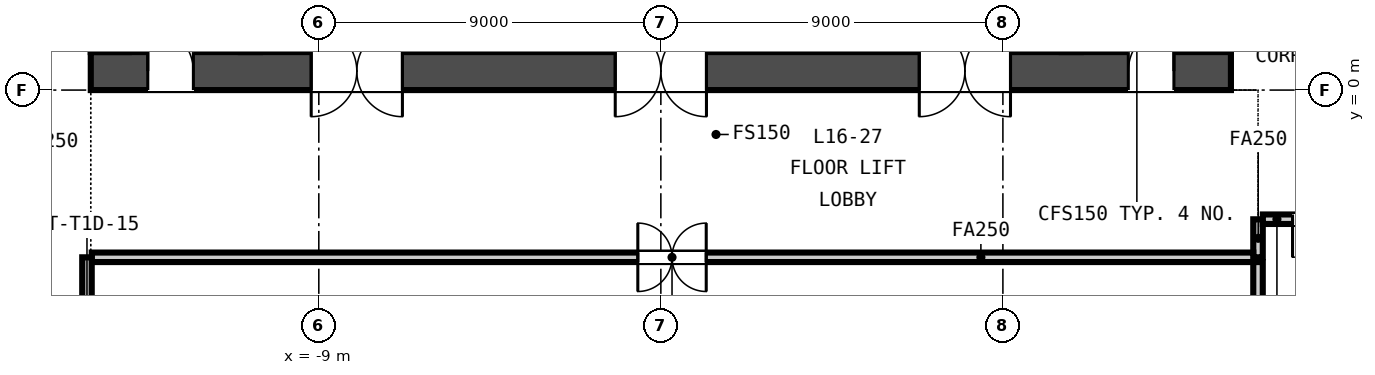
"""IFC4 building model, lengths in metres.
Left out: names, types, materials, properties, quantities, classifications, styles, units other than length and angle.
Written with IfcOpenShell. Run it as: python <this file> out.ifc"""

import sys

from ifc_helpers import new_model, si_unit, direction, frame, frame_2d, origin, place, context, subcontext, project, spatial, rectangle, extrude, element, fill, save


model = new_model("IFC4")
c1 = context("Model", 3, precision=1e-05, world=origin(), true_north=direction((0.0, 1.0)))
c2 = subcontext(c1, "Body", "Model", "MODEL_VIEW")
j1 = project(units=[si_unit("LENGTHUNIT", "METRE"), si_unit("PLANEANGLEUNIT", "RADIAN")], contexts=[c1])
p1 = place(None, origin())
s1 = spatial("IfcSite", under=j1, at=p1, CompositionType="ELEMENT")
p2 = place(p1, origin())
s2 = spatial("IfcBuilding", under=s1, at=p2, CompositionType="ELEMENT")
p3 = place(p2, frame((0.0, 0.0, 72.5)))
s3 = spatial("IfcBuildingStorey", under=s2, at=p3, CompositionType="ELEMENT", Elevation=72.5)
p4 = place(p3, frame((-15.0, 0.5, -0.15), z_axis=(0.0, 0.0, 1.0), x_axis=(1.0, 0.0, 0.0)))
e1 = element("IfcWall", 1, at=p4, inside=s3, PredefinedType="SOLIDWALL", context=c2, shape_type="SweptSolid", body=[
    extrude(rectangle(XDim=30.0, YDim=1.0, at=frame_2d((15.0, 0.0))), origin(), (0.0, 0.0, 1.0), 3.5),
])
p5 = place(p4, frame((5.8, 0.0, 0.15)))
e2 = element("IfcOpeningElement", 2, at=p5, cuts=e1, PredefinedType="OPENING", context=c2, shape_type="SweptSolid", body=[
    extrude(rectangle(XDim=2.4, YDim=2.4, at=frame_2d((1.2, 1.2))), frame((0.0, 0.51, 0.0), z_axis=(0.0, -1.0, 0.0), x_axis=(1.0, 0.0, 0.0)), (0.0, 0.0, 1.0), 1.02),
])
p6 = place(p4, frame((13.8, 0.0, 0.15)))
e3 = element("IfcOpeningElement", 3, at=p6, cuts=e1, PredefinedType="OPENING", context=c2, shape_type="SweptSolid", body=[
    extrude(rectangle(XDim=2.4, YDim=2.4, at=frame_2d((1.2, 1.2))), frame((0.0, 0.51, 0.0), z_axis=(0.0, -1.0, 0.0), x_axis=(1.0, 0.0, 0.0)), (0.0, 0.0, 1.0), 1.02),
])
p7 = place(p4, frame((21.8, 0.0, 0.15)))
e4 = element("IfcOpeningElement", 4, at=p7, cuts=e1, PredefinedType="OPENING", context=c2, shape_type="SweptSolid", body=[
    extrude(rectangle(XDim=2.4, YDim=2.4, at=frame_2d((1.2, 1.2))), frame((0.0, 0.51, 0.0), z_axis=(0.0, -1.0, 0.0), x_axis=(1.0, 0.0, 0.0)), (0.0, 0.0, 1.0), 1.02),
])
p8 = place(p4, frame((1.5, 0.0, 0.15)))
e5 = element("IfcOpeningElement", 5, at=p8, cuts=e1, PredefinedType="OPENING", context=c2, shape_type="SweptSolid", body=[
    extrude(rectangle(XDim=1.2, YDim=2.1, at=frame_2d((0.6, 1.05))), frame((0.0, 0.51, 0.0), z_axis=(0.0, -1.0, 0.0), x_axis=(1.0, 0.0, 0.0)), (0.0, 0.0, 1.0), 1.02),
])
p9 = place(p4, frame((27.3, 0.0, 0.15)))
e6 = element("IfcOpeningElement", 6, at=p9, cuts=e1, PredefinedType="OPENING", context=c2, shape_type="SweptSolid", body=[
    extrude(rectangle(XDim=1.2, YDim=2.1, at=frame_2d((0.6, 1.05))), frame((0.0, 0.51, 0.0), z_axis=(0.0, -1.0, 0.0), x_axis=(1.0, 0.0, 0.0)), (0.0, 0.0, 1.0), 1.02),
])
p10 = place(p3, frame((15.713, -3.4, 0.0), z_axis=(0.0, 0.0, 1.0), x_axis=(0.0, -1.0, 0.0)))
e7 = element("IfcWall", 7, at=p10, inside=s3, PredefinedType="PARTITIONING", context=c2, shape_type="SweptSolid", body=[
    extrude(rectangle(XDim=1.0, YDim=0.25, at=frame_2d((0.5, 0.0))), origin(), (0.0, 0.0, 1.0), 2.591),
])
p11 = place(p3, frame((15.588, -4.4, 0.0), z_axis=(0.0, 0.0, 1.0), x_axis=(-1.0, 0.0, 0.0)))
e8 = element("IfcWall", 8, at=p11, inside=s3, PredefinedType="PARTITIONING", context=c2, shape_type="SweptSolid", body=[
    extrude(rectangle(XDim=30.563, YDim=0.25, at=frame_2d((15.281, 0.0))), origin(), (0.0, 0.0, 1.0), 2.591),
])
p12 = place(p11, frame((14.394, 0.0, 0.0)))
e9 = element("IfcOpeningElement", 9, at=p12, cuts=e8, PredefinedType="OPENING", context=c2, shape_type="SweptSolid", body=[
    extrude(rectangle(XDim=1.8, YDim=2.1, at=frame_2d((0.9, 1.05))), frame((0.0, 0.135, 0.0), z_axis=(0.0, -1.0, 0.0), x_axis=(1.0, 0.0, 0.0)), (0.0, 0.0, 1.0), 0.27),
])
p13 = place(p3, frame((-15.1, -4.4, 0.0), z_axis=(0.0, 0.0, 1.0), x_axis=(0.0, -1.0, 0.0)))
e10 = element("IfcWall", 10, at=p13, inside=s3, PredefinedType="PARTITIONING", context=c2, shape_type="SweptSolid", body=[
    extrude(rectangle(XDim=11.875, YDim=0.25, at=frame_2d((5.938, 0.0))), origin(), (0.0, 0.0, 1.0), 2.591),
])
p14 = place(p13, frame((5.038, 0.0, 0.0)))
e11 = element("IfcOpeningElement", 11, at=p14, cuts=e10, PredefinedType="OPENING", context=c2, shape_type="SweptSolid", body=[
    extrude(rectangle(XDim=1.8, YDim=2.1, at=frame_2d((0.9, 1.05))), frame((0.0, 0.135, 0.0), z_axis=(0.0, -1.0, 0.0), x_axis=(1.0, 0.0, 0.0)), (0.0, 0.0, 1.0), 0.27),
])
p15 = place(p3, frame((18.402, -3.398, 0.0), z_axis=(0.0, 0.0, 1.0), x_axis=(-1.0, 0.0, 0.0)))
e12 = element("IfcWall", 12, at=p15, inside=s3, PredefinedType="PARTITIONING", context=c2, shape_type="SweptSolid", body=[
    extrude(rectangle(XDim=2.562, YDim=0.25, at=frame_2d((1.281, 0.0))), origin(), (0.0, 0.0, 1.0), 2.591),
])
p16 = place(p15, frame((0.781, 0.0, 0.0)))
e13 = element("IfcOpeningElement", 13, at=p16, cuts=e12, PredefinedType="OPENING", context=c2, shape_type="SweptSolid", body=[
    extrude(rectangle(XDim=1.0, YDim=2.1, at=frame_2d((0.5, 1.05))), frame((0.0, 0.135, 0.0), z_axis=(0.0, -1.0, 0.0), x_axis=(1.0, 0.0, 0.0)), (0.0, 0.0, 1.0), 0.27),
])
p17 = place(p3, frame((15.713, -4.525, 0.0), z_axis=(0.0, 0.0, 1.0), x_axis=(0.0, -1.0, 0.0)))
e14 = element("IfcWall", 14, at=p17, inside=s3, PredefinedType="PARTITIONING", context=c2, shape_type="SweptSolid", body=[
    extrude(rectangle(XDim=3.7, YDim=0.25, at=frame_2d((1.85, 0.0))), origin(), (0.0, 0.0, 1.0), 2.591),
])
p18 = place(p5, origin())
e15 = element("IfcDoor", 15, at=p18, inside=s3, OperationType="DOUBLE_DOOR_DOUBLE_SWING", PredefinedType="DOOR", context=c2, shape_type="SweptSolid", body=[
    extrude(rectangle(XDim=2.4, YDim=2.4, at=frame_2d((1.2, 1.2))), frame((0.0, 0.025, 0.0), z_axis=(0.0, -1.0, 0.0), x_axis=(1.0, 0.0, 0.0)), (0.0, 0.0, 1.0), 0.05),
])
fill(e2, e15)
p19 = place(p6, origin())
e16 = element("IfcDoor", 16, at=p19, inside=s3, OperationType="DOUBLE_DOOR_DOUBLE_SWING", PredefinedType="DOOR", context=c2, shape_type="SweptSolid", body=[
    extrude(rectangle(XDim=2.4, YDim=2.4, at=frame_2d((1.2, 1.2))), frame((0.0, 0.025, 0.0), z_axis=(0.0, -1.0, 0.0), x_axis=(1.0, 0.0, 0.0)), (0.0, 0.0, 1.0), 0.05),
])
fill(e3, e16)
p20 = place(p7, origin())
e17 = element("IfcDoor", 17, at=p20, inside=s3, OperationType="DOUBLE_DOOR_DOUBLE_SWING", PredefinedType="DOOR", context=c2, shape_type="SweptSolid", body=[
    extrude(rectangle(XDim=2.4, YDim=2.4, at=frame_2d((1.2, 1.2))), frame((0.0, 0.025, 0.0), z_axis=(0.0, -1.0, 0.0), x_axis=(1.0, 0.0, 0.0)), (0.0, 0.0, 1.0), 0.05),
])
fill(e4, e17)
p21 = place(p8, origin())
e18 = element("IfcDoor", 18, at=p21, inside=s3, OperationType="SINGLE_SWING_LEFT", PredefinedType="DOOR", context=c2, shape_type="SweptSolid", body=[
    extrude(rectangle(XDim=1.2, YDim=2.1, at=frame_2d((0.6, 1.05))), frame((0.0, 0.025, 0.0), z_axis=(0.0, -1.0, 0.0), x_axis=(1.0, 0.0, 0.0)), (0.0, 0.0, 1.0), 0.05),
])
fill(e5, e18)
p22 = place(p9, origin())
e19 = element("IfcDoor", 19, at=p22, inside=s3, OperationType="SINGLE_SWING_RIGHT", PredefinedType="DOOR", context=c2, shape_type="SweptSolid", body=[
    extrude(rectangle(XDim=1.2, YDim=2.1, at=frame_2d((0.6, 1.05))), frame((0.0, 0.025, 0.0), z_axis=(0.0, -1.0, 0.0), x_axis=(1.0, 0.0, 0.0)), (0.0, 0.0, 1.0), 0.05),
])
fill(e6, e19)
p23 = place(p16, origin())
e20 = element("IfcDoor", 20, at=p23, inside=s3, OperationType="SINGLE_SWING_RIGHT", PredefinedType="DOOR", context=c2, shape_type="SweptSolid", body=[
    extrude(rectangle(XDim=1.0, YDim=2.1, at=frame_2d((0.5, 1.05))), frame((0.0, 0.025, 0.0), z_axis=(0.0, -1.0, 0.0), x_axis=(1.0, 0.0, 0.0)), (0.0, 0.0, 1.0), 0.05),
])
fill(e13, e20)
p24 = place(p12, origin())
e21 = element("IfcDoor", 21, at=p24, inside=s3, OperationType="DOUBLE_DOOR_DOUBLE_SWING", PredefinedType="DOOR", context=c2, shape_type="SweptSolid", body=[
    extrude(rectangle(XDim=1.8, YDim=2.1, at=frame_2d((0.9, 1.05))), frame((0.0, 0.025, 0.0), z_axis=(0.0, -1.0, 0.0), x_axis=(1.0, 0.0, 0.0)), (0.0, 0.0, 1.0), 0.05),
])
fill(e9, e21)
save(model, sys.argv[1])
